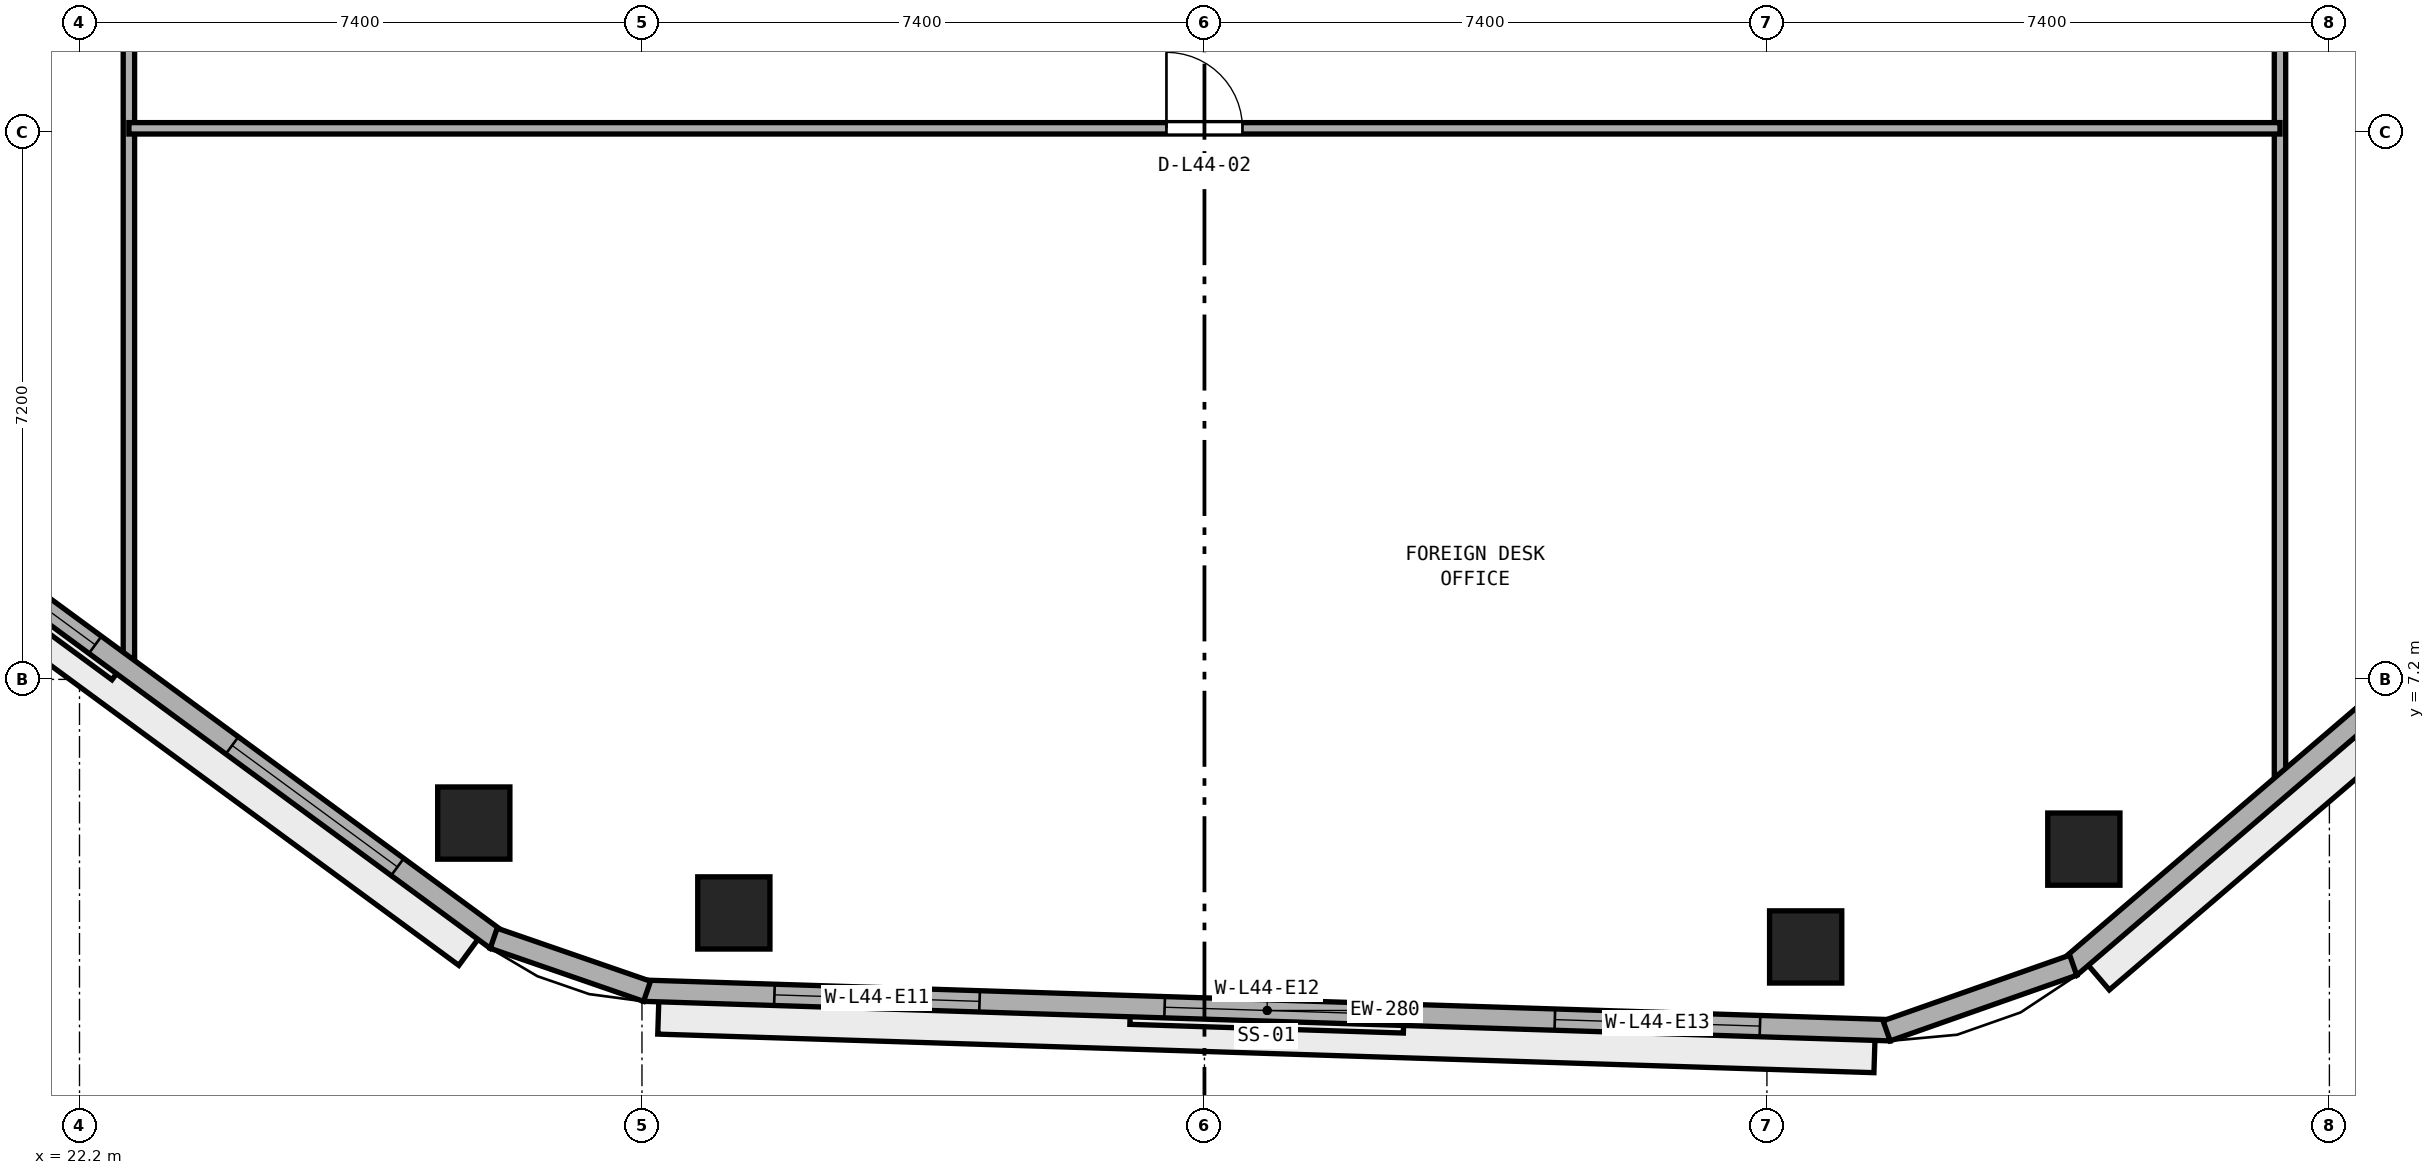
"""IFC4 building model, lengths in metres.
Left out: names, types, materials, properties, quantities, classifications, styles, units other than length and angle.
Written with IfcOpenShell. Run it as: python <this file> out.ifc"""

import sys

from ifc_helpers import new_model, si_unit, direction, frame, frame_2d, origin, origin_2d, place, context, subcontext, project, spatial, rectangle, extrude, element, fill, save


model = new_model("IFC4")
c1 = context("Model", 3, precision=1e-05, world=origin(), true_north=direction((0.0, 1.0)))
c2 = subcontext(c1, "Body", "Model", "MODEL_VIEW")
j1 = project(units=[si_unit("LENGTHUNIT", "METRE"), si_unit("PLANEANGLEUNIT", "RADIAN")], contexts=[c1])
p1 = place(None, origin())
s1 = spatial("IfcSite", under=j1, at=p1, CompositionType="ELEMENT")
p2 = place(p1, origin())
s2 = spatial("IfcBuilding", under=s1, at=p2, CompositionType="ELEMENT")
p3 = place(p2, frame((0.0, 0.0, 174.4)))
s3 = spatial("IfcBuildingStorey", under=s2, at=p3, CompositionType="ELEMENT", Elevation=174.4)
for number, where, z_axis, x_axis in (
    (1, (30.809, 4.127, 0.0), (0.0, 0.0, 1.0), (1.0, 0.0, 0.0)),
    (2, (44.91, 3.68, 0.0), (0.0, 0.0, 1.0), (1.0, 0.0, 0.0)),
    (3, (48.57, 4.967, 0.0), (0.0, 0.0, 1.0), (1.0, 0.0, 0.0)),
    (4, (27.387, 5.31, 0.0), (0.0, 0.0, 1.0), (1.0, 0.0, 0.0)),
):
    element("IfcColumn", number, at=place(p3, frame(where, z_axis=z_axis, x_axis=x_axis)), inside=s3, PredefinedType="COLUMN", context=c2, shape_type="SweptSolid", body=[
        extrude(rectangle(XDim=0.95, YDim=0.95, at=origin_2d()), origin(), (0.0, 0.0, 1.0), 3.8),
    ])
p4 = place(p3, frame((51.15, 5.736, 0.0), z_axis=(0.0, 0.0, 1.0), x_axis=(0.0, 1.0, 0.0)))
e5 = element("IfcWall", 5, at=p4, inside=s3, PredefinedType="PARTITIONING", context=c2, shape_type="SweptSolid", body=[
    extrude(rectangle(XDim=18.114, YDim=0.15, at=frame_2d((9.057, 0.0))), origin(), (0.0, 0.0, 1.0), 3.54),
])
p5 = place(p4, frame((12.039, 0.0, 0.0)))
e6 = element("IfcOpeningElement", 6, at=p5, cuts=e5, PredefinedType="OPENING", context=c2, shape_type="SweptSolid", body=[
    extrude(rectangle(XDim=0.9, YDim=2.1, at=frame_2d((0.45, 1.05))), frame((0.0, 0.085, 0.0), z_axis=(0.0, -1.0, 0.0), x_axis=(1.0, 0.0, 0.0)), (0.0, 0.0, 1.0), 0.17),
])
p6 = place(p3, frame((22.85, 7.295, 0.0), z_axis=(0.0, 0.0, 1.0), x_axis=(0.0, 1.0, 0.0)))
e7 = element("IfcWall", 7, at=p6, inside=s3, PredefinedType="PARTITIONING", context=c2, shape_type="SweptSolid", body=[
    extrude(rectangle(XDim=16.555, YDim=0.15, at=frame_2d((8.277, 0.0))), origin(), (0.0, 0.0, 1.0), 3.54),
])
p7 = place(p6, frame((9.78, 0.0, 0.0)))
e8 = element("IfcOpeningElement", 8, at=p7, cuts=e7, PredefinedType="OPENING", context=c2, shape_type="SweptSolid", body=[
    extrude(rectangle(XDim=1.0, YDim=2.12, at=frame_2d((0.5, 1.06))), frame((0.0, 0.085, 0.0), z_axis=(0.0, -1.0, 0.0), x_axis=(1.0, 0.0, 0.0)), (0.0, 0.0, 1.0), 0.17),
])
p8 = place(p3, frame((22.85, 14.45, 0.0), z_axis=(0.0, 0.0, 1.0), x_axis=(1.0, 0.0, 0.0)))
e9 = element("IfcWall", 9, at=p8, inside=s3, PredefinedType="PARTITIONING", context=c2, shape_type="SweptSolid", body=[
    extrude(rectangle(XDim=28.3, YDim=0.15, at=frame_2d((14.15, 0.0))), origin(), (0.0, 0.0, 1.0), 3.54),
])
p9 = place(p8, frame((13.65, 0.0, 0.0)))
e10 = element("IfcOpeningElement", 10, at=p9, cuts=e9, PredefinedType="OPENING", context=c2, shape_type="SweptSolid", body=[
    extrude(rectangle(XDim=1.0, YDim=2.12, at=frame_2d((0.5, 1.06))), frame((0.0, 0.085, 0.0), z_axis=(0.0, -1.0, 0.0), x_axis=(1.0, 0.0, 0.0)), (0.0, 0.0, 1.0), 0.17),
])
p10 = place(p3, frame((29.625, 3.104, 0.0), z_axis=(0.0, 0.0, 1.0), x_axis=(0.99949718661, -0.031707632487, 0.0)))
e11 = element("IfcWall", 11, at=p10, inside=s3, PredefinedType="STANDARD", context=c2, shape_type="SweptSolid", body=[
    extrude(rectangle(XDim=16.408, YDim=0.28, at=frame_2d((8.204, 0.0))), origin(), (0.0, 0.0, 1.0), 3.54),
])
p11 = place(p10, frame((1.718, 0.0, 0.9)))
e12 = element("IfcOpeningElement", 12, at=p11, cuts=e11, PredefinedType="OPENING", context=c2, shape_type="SweptSolid", body=[
    extrude(rectangle(XDim=2.7, YDim=1.75, at=frame_2d((1.35, 0.875))), frame((0.0, 0.15, 0.0), z_axis=(0.0, -1.0, 0.0), x_axis=(1.0, 0.0, 0.0)), (0.0, 0.0, 1.0), 0.3),
])
p12 = place(p10, frame((6.854, 0.0, 0.9)))
e13 = element("IfcOpeningElement", 13, at=p12, cuts=e11, PredefinedType="OPENING", context=c2, shape_type="SweptSolid", body=[
    extrude(rectangle(XDim=2.7, YDim=1.75, at=frame_2d((1.35, 0.875))), frame((0.0, 0.15, 0.0), z_axis=(0.0, -1.0, 0.0), x_axis=(1.0, 0.0, 0.0)), (0.0, 0.0, 1.0), 0.3),
])
p13 = place(p10, frame((11.99, 0.0, 0.9)))
e14 = element("IfcOpeningElement", 14, at=p13, cuts=e11, PredefinedType="OPENING", context=c2, shape_type="SweptSolid", body=[
    extrude(rectangle(XDim=2.7, YDim=1.75, at=frame_2d((1.35, 0.875))), frame((0.0, 0.15, 0.0), z_axis=(0.0, -1.0, 0.0), x_axis=(1.0, 0.0, 0.0)), (0.0, 0.0, 1.0), 0.3),
])
p14 = place(p3, frame((48.385, 3.414, 0.0), z_axis=(0.0, 0.0, 1.0), x_axis=(0.759700260779, 0.650273414628, 0.0)))
e15 = element("IfcWall", 15, at=p14, inside=s3, PredefinedType="STANDARD", context=c2, shape_type="SweptSolid", body=[
    extrude(rectangle(XDim=15.881, YDim=0.28, at=frame_2d((7.94, 0.0))), origin(), (0.0, 0.0, 1.0), 3.54),
])
p15 = place(p14, frame((6.59, 0.0, 0.9)))
e16 = element("IfcOpeningElement", 16, at=p15, cuts=e15, PredefinedType="OPENING", context=c2, shape_type="SweptSolid", body=[
    extrude(rectangle(XDim=2.7, YDim=1.75, at=frame_2d((1.35, 0.875))), frame((0.0, 0.15, 0.0), z_axis=(0.0, -1.0, 0.0), x_axis=(1.0, 0.0, 0.0)), (0.0, 0.0, 1.0), 0.3),
])
p16 = place(p14, frame((11.551, 0.0, 0.9)))
e17 = element("IfcOpeningElement", 17, at=p16, cuts=e15, PredefinedType="OPENING", context=c2, shape_type="SweptSolid", body=[
    extrude(rectangle(XDim=2.7, YDim=1.75, at=frame_2d((1.35, 0.875))), frame((0.0, 0.15, 0.0), z_axis=(0.0, -1.0, 0.0), x_axis=(1.0, 0.0, 0.0)), (0.0, 0.0, 1.0), 0.3),
])
p17 = place(p3, frame((14.951, 13.134, 0.0), z_axis=(0.0, 0.0, 1.0), x_axis=(0.805804940328, -0.592181051827, 0.0)))
e18 = element("IfcWall", 18, at=p17, inside=s3, PredefinedType="STANDARD", context=c2, shape_type="SweptSolid", body=[
    extrude(rectangle(XDim=15.804, YDim=0.28, at=frame_2d((7.902, 0.0))), origin(), (0.0, 0.0, 1.0), 3.54),
])
p18 = place(p17, frame((1.617, 0.0, 0.9)))
e19 = element("IfcOpeningElement", 19, at=p18, cuts=e18, PredefinedType="OPENING", context=c2, shape_type="SweptSolid", body=[
    extrude(rectangle(XDim=2.7, YDim=1.75, at=frame_2d((1.35, 0.875))), frame((0.0, 0.15, 0.0), z_axis=(0.0, -1.0, 0.0), x_axis=(1.0, 0.0, 0.0)), (0.0, 0.0, 1.0), 0.3),
])
p19 = place(p17, frame((6.552, 0.0, 0.9)))
e20 = element("IfcOpeningElement", 20, at=p19, cuts=e18, PredefinedType="OPENING", context=c2, shape_type="SweptSolid", body=[
    extrude(rectangle(XDim=2.7, YDim=1.75, at=frame_2d((1.35, 0.875))), frame((0.0, 0.15, 0.0), z_axis=(0.0, -1.0, 0.0), x_axis=(1.0, 0.0, 0.0)), (0.0, 0.0, 1.0), 0.3),
])
p20 = place(p17, frame((11.487, 0.0, 0.9)))
e21 = element("IfcOpeningElement", 21, at=p20, cuts=e18, PredefinedType="OPENING", context=c2, shape_type="SweptSolid", body=[
    extrude(rectangle(XDim=2.7, YDim=1.75, at=frame_2d((1.35, 0.875))), frame((0.0, 0.15, 0.0), z_axis=(0.0, -1.0, 0.0), x_axis=(1.0, 0.0, 0.0)), (0.0, 0.0, 1.0), 0.3),
])
p21 = place(p3, frame((45.975, 2.576, 0.0), z_axis=(0.0, 0.0, 1.0), x_axis=(0.943377643365, 0.331720698781, 0.0)))
e22 = element("IfcWall", 22, at=p21, inside=s3, PredefinedType="STANDARD", context=c2, shape_type="SweptSolid", body=[
    extrude(rectangle(XDim=2.603, YDim=0.28, at=frame_2d((1.301, 0.0))), origin(), (0.0, 0.0, 1.0), 3.54),
])
p22 = place(p3, frame((27.649, 3.794, 0.0), z_axis=(0.0, 0.0, 1.0), x_axis=(0.945149124969, -0.326639145802, 0.0)))
e23 = element("IfcWall", 23, at=p22, inside=s3, PredefinedType="STANDARD", context=c2, shape_type="SweptSolid", body=[
    extrude(rectangle(XDim=2.135, YDim=0.28, at=frame_2d((1.067, 0.0))), origin(), (0.0, 0.0, 1.0), 3.54),
])
p23 = place(p9, origin())
e24 = element("IfcDoor", 24, at=p23, inside=s3, OperationType="SINGLE_SWING_LEFT", PredefinedType="DOOR", context=c2, shape_type="SweptSolid", body=[
    extrude(rectangle(XDim=1.0, YDim=2.12, at=frame_2d((0.5, 1.06))), frame((0.0, 0.025, 0.0), z_axis=(0.0, -1.0, 0.0), x_axis=(1.0, 0.0, 0.0)), (0.0, 0.0, 1.0), 0.05),
])
fill(e10, e24)
p24 = place(p11, origin())
e25 = element("IfcWindow", 25, at=p24, inside=s3, PartitioningType="SINGLE_PANEL", PredefinedType="WINDOW", context=c2, shape_type="SweptSolid", body=[
    extrude(rectangle(XDim=2.7, YDim=1.75, at=frame_2d((1.35, 0.875))), frame((0.0, 0.03, 0.0), z_axis=(0.0, -1.0, 0.0), x_axis=(1.0, 0.0, 0.0)), (0.0, 0.0, 1.0), 0.06),
])
fill(e12, e25)
p25 = place(p12, origin())
e26 = element("IfcWindow", 26, at=p25, inside=s3, PartitioningType="SINGLE_PANEL", PredefinedType="WINDOW", context=c2, shape_type="SweptSolid", body=[
    extrude(rectangle(XDim=2.7, YDim=1.75, at=frame_2d((1.35, 0.875))), frame((0.0, 0.03, 0.0), z_axis=(0.0, -1.0, 0.0), x_axis=(1.0, 0.0, 0.0)), (0.0, 0.0, 1.0), 0.06),
])
fill(e13, e26)
p26 = place(p13, origin())
e27 = element("IfcWindow", 27, at=p26, inside=s3, PartitioningType="SINGLE_PANEL", PredefinedType="WINDOW", context=c2, shape_type="SweptSolid", body=[
    extrude(rectangle(XDim=2.7, YDim=1.75, at=frame_2d((1.35, 0.875))), frame((0.0, 0.03, 0.0), z_axis=(0.0, -1.0, 0.0), x_axis=(1.0, 0.0, 0.0)), (0.0, 0.0, 1.0), 0.06),
])
fill(e14, e27)
p27 = place(p19, origin())
e28 = element("IfcWindow", 28, at=p27, inside=s3, PartitioningType="SINGLE_PANEL", PredefinedType="WINDOW", context=c2, shape_type="SweptSolid", body=[
    extrude(rectangle(XDim=2.7, YDim=1.75, at=frame_2d((1.35, 0.875))), frame((0.0, 0.03, 0.0), z_axis=(0.0, -1.0, 0.0), x_axis=(1.0, 0.0, 0.0)), (0.0, 0.0, 1.0), 0.06),
])
fill(e20, e28)
p28 = place(p20, origin())
e29 = element("IfcWindow", 29, at=p28, inside=s3, PartitioningType="SINGLE_PANEL", PredefinedType="WINDOW", context=c2, shape_type="SweptSolid", body=[
    extrude(rectangle(XDim=2.7, YDim=1.75, at=frame_2d((1.35, 0.875))), frame((0.0, 0.03, 0.0), z_axis=(0.0, -1.0, 0.0), x_axis=(1.0, 0.0, 0.0)), (0.0, 0.0, 1.0), 0.06),
])
fill(e21, e29)
save(model, sys.argv[1])
